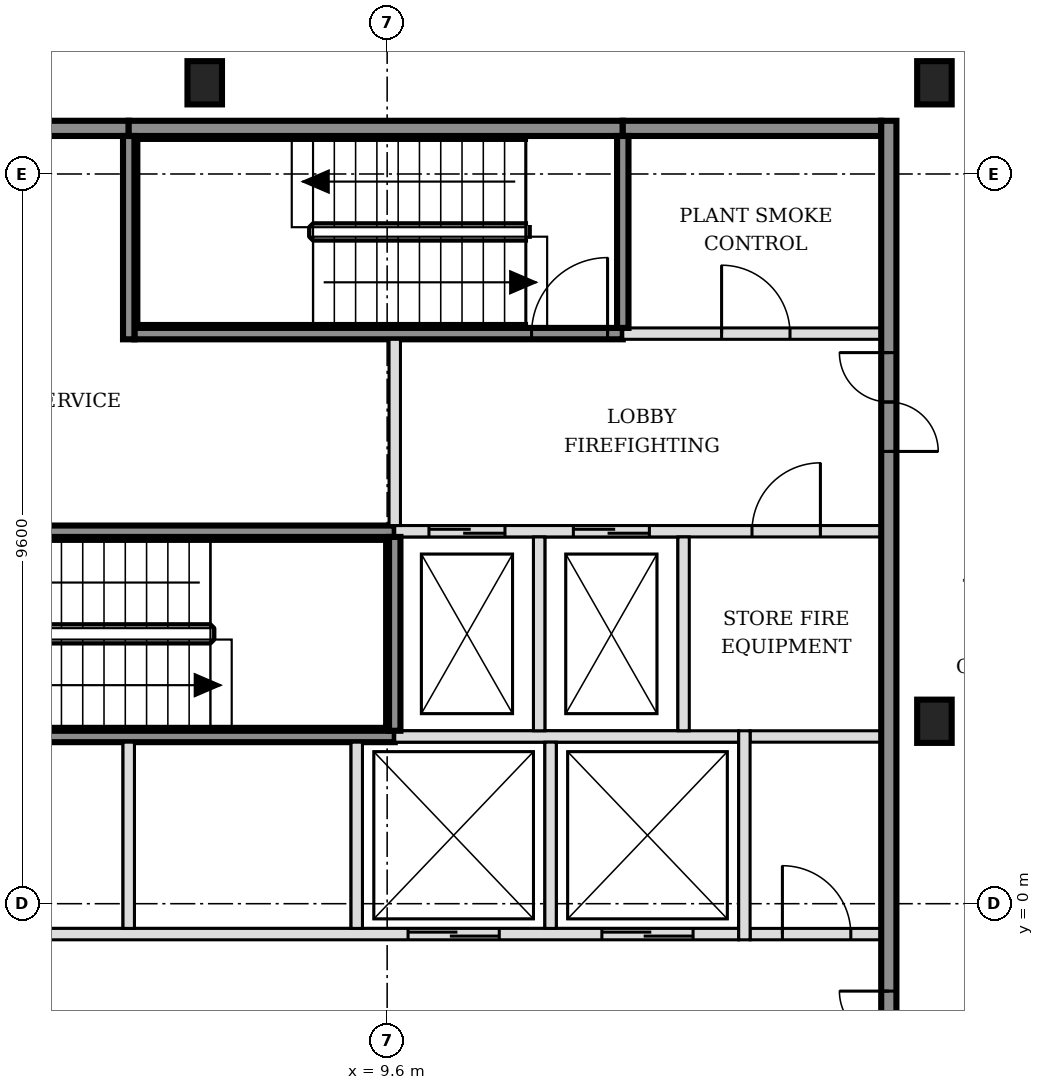
"""IFC4 building model, lengths in metres.
Left out: names, types, materials, properties, quantities, classifications, styles, units other than length and angle.
Written with IfcOpenShell. Run it as: python <this file> out.ifc"""

import sys

from ifc_helpers import new_model, si_unit, direction, frame, frame_2d, origin, origin_2d, place, context, subcontext, project, spatial, rectangle, i_section, extrude, element, fill, save


model = new_model("IFC4")
c1 = context("Model", 3, precision=1e-05, world=origin(), true_north=direction((0.0, 1.0)))
c2 = subcontext(c1, "Body", "Model", "MODEL_VIEW")
j1 = project(units=[si_unit("LENGTHUNIT", "METRE"), si_unit("PLANEANGLEUNIT", "RADIAN")], contexts=[c1])
p1 = place(None, origin())
s1 = spatial("IfcSite", under=j1, at=p1, CompositionType="ELEMENT")
p2 = place(p1, origin())
s2 = spatial("IfcBuilding", under=s1, at=p2, CompositionType="ELEMENT")
p3 = place(p2, frame((0.0, 0.0, 61.8)))
s3 = spatial("IfcBuildingStorey", under=s2, at=p3, CompositionType="ELEMENT", Elevation=61.8)
for number, where, z_axis, x_axis in (
    (1, (16.8, 2.4, -0.15), (0.0, 0.0, 1.0), (1.0, 0.0, 0.0)),
    (2, (7.2, 10.8, -0.15), (0.0, 0.0, 1.0), (1.0, 0.0, 0.0)),
    (3, (16.8, 10.8, -0.15), (0.0, 0.0, 1.0), (1.0, 0.0, 0.0)),
):
    element("IfcColumn", number, at=place(p3, frame(where, z_axis=z_axis, x_axis=x_axis)), inside=s3, PredefinedType="COLUMN", context=c2, shape_type="SweptSolid", body=[
        extrude(i_section(OverallWidth=0.454, OverallDepth=0.569, WebThickness=0.078, FlangeThickness=0.125, FilletRadius=0.015, at=origin_2d()), origin(), (0.0, 0.0, 1.0), 3.6),
    ])
p4 = place(p3, frame((-1.7, -0.4, 0.0), z_axis=(0.0, 0.0, 1.0), x_axis=(1.0, 0.0, 0.0)))
e4 = element("IfcWall", 4, at=p4, inside=s3, PredefinedType="SOLIDWALL", context=c2, shape_type="SweptSolid", body=[
    extrude(rectangle(XDim=15.925, YDim=0.15, at=frame_2d((7.962, 0.0))), origin(), (0.0, 0.0, 1.0), 3.45),
])
p5 = place(p4, frame((0.6, 0.0, 0.0)))
e5 = element("IfcOpeningElement", 5, at=p5, cuts=e4, PredefinedType="OPENING", context=c2, shape_type="SweptSolid", body=[
    extrude(rectangle(XDim=1.1, YDim=2.1, at=frame_2d((0.55, 1.05))), frame((0.0, 0.085, 0.0), z_axis=(0.0, -1.0, 0.0), x_axis=(1.0, 0.0, 0.0)), (0.0, 0.0, 1.0), 0.17),
])
p6 = place(p4, frame((3.1, 0.0, 0.0)))
e6 = element("IfcOpeningElement", 6, at=p6, cuts=e4, PredefinedType="OPENING", context=c2, shape_type="SweptSolid", body=[
    extrude(rectangle(XDim=1.1, YDim=2.1, at=frame_2d((0.55, 1.05))), frame((0.0, 0.085, 0.0), z_axis=(0.0, -1.0, 0.0), x_axis=(1.0, 0.0, 0.0)), (0.0, 0.0, 1.0), 0.17),
])
p7 = place(p4, frame((11.575, 0.0, 0.0)))
e7 = element("IfcOpeningElement", 7, at=p7, cuts=e4, PredefinedType="OPENING", context=c2, shape_type="SweptSolid", body=[
    extrude(rectangle(XDim=1.2, YDim=2.1, at=frame_2d((0.6, 1.05))), frame((0.0, 0.085, 0.0), z_axis=(0.0, -1.0, 0.0), x_axis=(1.0, 0.0, 0.0)), (0.0, 0.0, 1.0), 0.17),
])
p8 = place(p4, frame((14.125, 0.0, 0.0)))
e8 = element("IfcOpeningElement", 8, at=p8, cuts=e4, PredefinedType="OPENING", context=c2, shape_type="SweptSolid", body=[
    extrude(rectangle(XDim=1.2, YDim=2.1, at=frame_2d((0.6, 1.05))), frame((0.0, 0.085, 0.0), z_axis=(0.0, -1.0, 0.0), x_axis=(1.0, 0.0, 0.0)), (0.0, 0.0, 1.0), 0.17),
])
p9 = place(p3, frame((14.375, -0.4, 0.0), z_axis=(0.0, 0.0, 1.0), x_axis=(1.0, 0.0, 0.0)))
e9 = element("IfcWall", 9, at=p9, inside=s3, PredefinedType="PARTITIONING", context=c2, shape_type="SweptSolid", body=[
    extrude(rectangle(XDim=1.725, YDim=0.15, at=frame_2d((0.863, 0.0))), origin(), (0.0, 0.0, 1.0), 3.45),
])
p10 = place(p9, frame((0.425, 0.0, 0.0)))
e10 = element("IfcOpeningElement", 10, at=p10, cuts=e9, PredefinedType="OPENING", context=c2, shape_type="SweptSolid", body=[
    extrude(rectangle(XDim=0.9, YDim=2.1, at=frame_2d((0.45, 1.05))), frame((0.0, 0.085, 0.0), z_axis=(0.0, -1.0, 0.0), x_axis=(1.0, 0.0, 0.0)), (0.0, 0.0, 1.0), 0.17),
])
p11 = place(p3, frame((3.2, 2.2, 0.0), z_axis=(0.0, 0.0, 1.0), x_axis=(1.0, 0.0, 0.0)))
e11 = element("IfcWall", 11, at=p11, inside=s3, PredefinedType="SOLIDWALL", context=c2, shape_type="SweptSolid", body=[
    extrude(rectangle(XDim=6.5, YDim=0.15, at=frame_2d((3.25, 0.0))), origin(), (0.0, 0.0, 1.0), 3.45),
])
p12 = place(p3, frame((9.7, 2.2, 0.0), z_axis=(0.0, 0.0, 1.0), x_axis=(1.0, 0.0, 0.0)))
e12 = element("IfcWall", 12, at=p12, inside=s3, PredefinedType="SOLIDWALL", context=c2, shape_type="SweptSolid", body=[
    extrude(rectangle(XDim=4.525, YDim=0.15, at=frame_2d((2.263, 0.0))), origin(), (0.0, 0.0, 1.0), 3.45),
])
p13 = place(p3, frame((14.375, 2.2, 0.0), z_axis=(0.0, 0.0, 1.0), x_axis=(1.0, 0.0, 0.0)))
e13 = element("IfcWall", 13, at=p13, inside=s3, PredefinedType="PARTITIONING", context=c2, shape_type="SweptSolid", body=[
    extrude(rectangle(XDim=1.725, YDim=0.15, at=frame_2d((0.863, 0.0))), origin(), (0.0, 0.0, 1.0), 3.45),
])
p14 = place(p3, frame((3.275, 4.9, 0.0), z_axis=(0.0, 0.0, 1.0), x_axis=(1.0, 0.0, 0.0)))
e14 = element("IfcWall", 14, at=p14, inside=s3, PredefinedType="SOLIDWALL", context=c2, shape_type="SweptSolid", body=[
    extrude(rectangle(XDim=6.425, YDim=0.15, at=frame_2d((3.212, 0.0))), origin(), (0.0, 0.0, 1.0), 3.45),
])
p15 = place(p14, frame((0.1, 0.0, 0.0)))
e15 = element("IfcOpeningElement", 15, at=p15, cuts=e14, PredefinedType="OPENING", context=c2, shape_type="SweptSolid", body=[
    extrude(rectangle(XDim=1.0, YDim=2.1, at=frame_2d((0.5, 1.05))), frame((0.0, 0.085, 0.0), z_axis=(0.0, -1.0, 0.0), x_axis=(1.0, 0.0, 0.0)), (0.0, 0.0, 1.0), 0.17),
])
p16 = place(p3, frame((9.7, 4.9, 0.0), z_axis=(0.0, 0.0, 1.0), x_axis=(1.0, 0.0, 0.0)))
e16 = element("IfcWall", 16, at=p16, inside=s3, PredefinedType="SOLIDWALL", context=c2, shape_type="SweptSolid", body=[
    extrude(rectangle(XDim=6.4, YDim=0.15, at=frame_2d((3.2, 0.0))), origin(), (0.0, 0.0, 1.0), 3.45),
])
p17 = place(p16, frame((0.45, 0.0, 0.0)))
e17 = element("IfcOpeningElement", 17, at=p17, cuts=e16, PredefinedType="OPENING", context=c2, shape_type="SweptSolid", body=[
    extrude(rectangle(XDim=1.0, YDim=2.1, at=frame_2d((0.5, 1.05))), frame((0.0, 0.085, 0.0), z_axis=(0.0, -1.0, 0.0), x_axis=(1.0, 0.0, 0.0)), (0.0, 0.0, 1.0), 0.17),
])
p18 = place(p16, frame((2.35, 0.0, 0.0)))
e18 = element("IfcOpeningElement", 18, at=p18, cuts=e16, PredefinedType="OPENING", context=c2, shape_type="SweptSolid", body=[
    extrude(rectangle(XDim=1.0, YDim=2.1, at=frame_2d((0.5, 1.05))), frame((0.0, 0.085, 0.0), z_axis=(0.0, -1.0, 0.0), x_axis=(1.0, 0.0, 0.0)), (0.0, 0.0, 1.0), 0.17),
])
p19 = place(p16, frame((4.7, 0.0, 0.0)))
e19 = element("IfcOpeningElement", 19, at=p19, cuts=e16, PredefinedType="OPENING", context=c2, shape_type="SweptSolid", body=[
    extrude(rectangle(XDim=0.9, YDim=2.1, at=frame_2d((0.45, 1.05))), frame((0.0, 0.085, 0.0), z_axis=(0.0, -1.0, 0.0), x_axis=(1.0, 0.0, 0.0)), (0.0, 0.0, 1.0), 0.17),
])
p20 = place(p3, frame((6.275, 7.5, 0.0), z_axis=(0.0, 0.0, 1.0), x_axis=(1.0, 0.0, 0.0)))
e20 = element("IfcWall", 20, at=p20, inside=s3, PredefinedType="SOLIDWALL", context=c2, shape_type="SweptSolid", body=[
    extrude(rectangle(XDim=6.425, YDim=0.15, at=frame_2d((3.212, 0.0))), origin(), (0.0, 0.0, 1.0), 3.45),
])
p21 = place(p20, frame((5.225, 0.0, 0.0)))
e21 = element("IfcOpeningElement", 21, at=p21, cuts=e20, PredefinedType="OPENING", context=c2, shape_type="SweptSolid", body=[
    extrude(rectangle(XDim=1.0, YDim=2.1, at=frame_2d((0.5, 1.05))), frame((0.0, 0.085, 0.0), z_axis=(0.0, -1.0, 0.0), x_axis=(1.0, 0.0, 0.0)), (0.0, 0.0, 1.0), 0.17),
])
p22 = place(p3, frame((12.7, 7.5, 0.0), z_axis=(0.0, 0.0, 1.0), x_axis=(1.0, 0.0, 0.0)))
e22 = element("IfcWall", 22, at=p22, inside=s3, PredefinedType="SOLIDWALL", context=c2, shape_type="SweptSolid", body=[
    extrude(rectangle(XDim=3.4, YDim=0.15, at=frame_2d((1.7, 0.0))), origin(), (0.0, 0.0, 1.0), 3.45),
])
p23 = place(p22, frame((1.3, 0.0, 0.0)))
e23 = element("IfcOpeningElement", 23, at=p23, cuts=e22, PredefinedType="OPENING", context=c2, shape_type="SweptSolid", body=[
    extrude(rectangle(XDim=0.9, YDim=2.1, at=frame_2d((0.45, 1.05))), frame((0.0, 0.085, 0.0), z_axis=(0.0, -1.0, 0.0), x_axis=(1.0, 0.0, 0.0)), (0.0, 0.0, 1.0), 0.17),
])
p24 = place(p3, frame((-1.7, 10.2, 0.0), z_axis=(0.0, 0.0, 1.0), x_axis=(1.0, 0.0, 0.0)))
e24 = element("IfcWall", 24, at=p24, inside=s3, PredefinedType="SOLIDWALL", context=c2, shape_type="SweptSolid", body=[
    extrude(rectangle(XDim=7.9, YDim=0.2, at=frame_2d((3.95, 0.0))), origin(), (0.0, 0.0, 1.0), 3.45),
])
p25 = place(p3, frame((6.2, 10.2, 0.0), z_axis=(0.0, 0.0, 1.0), x_axis=(1.0, 0.0, 0.0)))
e25 = element("IfcWall", 25, at=p25, inside=s3, PredefinedType="SOLIDWALL", context=c2, shape_type="SweptSolid", body=[
    extrude(rectangle(XDim=6.5, YDim=0.2, at=frame_2d((3.25, 0.0))), origin(), (0.0, 0.0, 1.0), 3.45),
])
p26 = place(p3, frame((12.7, 10.2, 0.0), z_axis=(0.0, 0.0, 1.0), x_axis=(1.0, 0.0, 0.0)))
e26 = element("IfcWall", 26, at=p26, inside=s3, PredefinedType="SOLIDWALL", context=c2, shape_type="SweptSolid", body=[
    extrude(rectangle(XDim=3.4, YDim=0.2, at=frame_2d((1.7, 0.0))), origin(), (0.0, 0.0, 1.0), 3.45),
])
p27 = place(p3, frame((6.2, -0.325, 0.0), z_axis=(0.0, 0.0, 1.0), x_axis=(0.0, 1.0, 0.0)))
e27 = element("IfcWall", 27, at=p27, inside=s3, PredefinedType="SOLIDWALL", context=c2, shape_type="SweptSolid", body=[
    extrude(rectangle(XDim=2.45, YDim=0.15, at=frame_2d((1.225, 0.0))), origin(), (0.0, 0.0, 1.0), 3.45),
])
p28 = place(p3, frame((6.2, 7.425, 0.0), z_axis=(0.0, 0.0, 1.0), x_axis=(0.0, 1.0, 0.0)))
e28 = element("IfcWall", 28, at=p28, inside=s3, PredefinedType="SOLIDWALL", context=c2, shape_type="SweptSolid", body=[
    extrude(rectangle(XDim=2.675, YDim=0.15, at=frame_2d((1.337, 0.0))), origin(), (0.0, 0.0, 1.0), 3.45),
])
p29 = place(p3, frame((9.2, -0.325, 0.0), z_axis=(0.0, 0.0, 1.0), x_axis=(0.0, 1.0, 0.0)))
e29 = element("IfcWall", 29, at=p29, inside=s3, PredefinedType="SOLIDWALL", context=c2, shape_type="SweptSolid", body=[
    extrude(rectangle(XDim=2.45, YDim=0.15, at=frame_2d((1.225, 0.0))), origin(), (0.0, 0.0, 1.0), 3.45),
])
p30 = place(p3, frame((9.7, 2.275, 0.0), z_axis=(0.0, 0.0, 1.0), x_axis=(0.0, 1.0, 0.0)))
e30 = element("IfcWall", 30, at=p30, inside=s3, PredefinedType="SOLIDWALL", context=c2, shape_type="SweptSolid", body=[
    extrude(rectangle(XDim=2.55, YDim=0.15, at=frame_2d((1.275, 0.0))), origin(), (0.0, 0.0, 1.0), 3.45),
])
p31 = place(p3, frame((9.7, 4.975, 0.0), z_axis=(0.0, 0.0, 1.0), x_axis=(0.0, 1.0, 0.0)))
e31 = element("IfcWall", 31, at=p31, inside=s3, PredefinedType="SOLIDWALL", context=c2, shape_type="SweptSolid", body=[
    extrude(rectangle(XDim=2.45, YDim=0.15, at=frame_2d((1.225, 0.0))), origin(), (0.0, 0.0, 1.0), 3.45),
])
p32 = place(p3, frame((11.6, 2.275, 0.0), z_axis=(0.0, 0.0, 1.0), x_axis=(0.0, 1.0, 0.0)))
e32 = element("IfcWall", 32, at=p32, inside=s3, PredefinedType="SOLIDWALL", context=c2, shape_type="SweptSolid", body=[
    extrude(rectangle(XDim=2.55, YDim=0.15, at=frame_2d((1.275, 0.0))), origin(), (0.0, 0.0, 1.0), 3.45),
])
p33 = place(p3, frame((11.75, -0.325, 0.0), z_axis=(0.0, 0.0, 1.0), x_axis=(0.0, 1.0, 0.0)))
e33 = element("IfcWall", 33, at=p33, inside=s3, PredefinedType="SOLIDWALL", context=c2, shape_type="SweptSolid", body=[
    extrude(rectangle(XDim=2.45, YDim=0.15, at=frame_2d((1.225, 0.0))), origin(), (0.0, 0.0, 1.0), 3.45),
])
p34 = place(p3, frame((12.7, 7.575, 0.0), z_axis=(0.0, 0.0, 1.0), x_axis=(0.0, 1.0, 0.0)))
e34 = element("IfcWall", 34, at=p34, inside=s3, PredefinedType="SOLIDWALL", context=c2, shape_type="SweptSolid", body=[
    extrude(rectangle(XDim=2.525, YDim=0.15, at=frame_2d((1.263, 0.0))), origin(), (0.0, 0.0, 1.0), 3.45),
])
p35 = place(p3, frame((13.5, 2.275, 0.0), z_axis=(0.0, 0.0, 1.0), x_axis=(0.0, 1.0, 0.0)))
e35 = element("IfcWall", 35, at=p35, inside=s3, PredefinedType="SOLIDWALL", context=c2, shape_type="SweptSolid", body=[
    extrude(rectangle(XDim=2.55, YDim=0.15, at=frame_2d((1.275, 0.0))), origin(), (0.0, 0.0, 1.0), 3.45),
])
p36 = place(p3, frame((14.3, -0.475, 0.0), z_axis=(0.0, 0.0, 1.0), x_axis=(0.0, 1.0, 0.0)))
e36 = element("IfcWall", 36, at=p36, inside=s3, PredefinedType="SOLIDWALL", context=c2, shape_type="SweptSolid", body=[
    extrude(rectangle(XDim=2.75, YDim=0.15, at=frame_2d((1.375, 0.0))), origin(), (0.0, 0.0, 1.0), 3.45),
])
p37 = place(p3, frame((16.2, -5.5, 0.0), z_axis=(0.0, 0.0, 1.0), x_axis=(0.0, 1.0, 0.0)))
e37 = element("IfcWall", 37, at=p37, inside=s3, PredefinedType="SOLIDWALL", context=c2, shape_type="SweptSolid", body=[
    extrude(rectangle(XDim=15.8, YDim=0.2, at=frame_2d((7.9, 0.0))), origin(), (0.0, 0.0, 1.0), 3.45),
])
p38 = place(p37, frame((3.05, 0.0, 0.0)))
e38 = element("IfcOpeningElement", 38, at=p38, cuts=e37, PredefinedType="OPENING", context=c2, shape_type="SweptSolid", body=[
    extrude(rectangle(XDim=1.3, YDim=2.1, at=frame_2d((0.65, 1.05))), frame((0.0, 0.11, 0.0), z_axis=(0.0, -1.0, 0.0), x_axis=(1.0, 0.0, 0.0)), (0.0, 0.0, 1.0), 0.22),
])
p39 = place(p37, frame((11.45, 0.0, 0.0)))
e39 = element("IfcOpeningElement", 39, at=p39, cuts=e37, PredefinedType="OPENING", context=c2, shape_type="SweptSolid", body=[
    extrude(rectangle(XDim=1.3, YDim=2.1, at=frame_2d((0.65, 1.05))), frame((0.0, 0.11, 0.0), z_axis=(0.0, -1.0, 0.0), x_axis=(1.0, 0.0, 0.0)), (0.0, 0.0, 1.0), 0.22),
])
p40 = place(p7, origin())
e40 = element("IfcDoor", 40, at=p40, inside=s3, OperationType="DOUBLE_DOOR_SLIDING", PredefinedType="DOOR", context=c2, shape_type="SweptSolid", body=[
    extrude(rectangle(XDim=1.2, YDim=2.1, at=frame_2d((0.6, 1.05))), frame((0.0, 0.025, 0.0), z_axis=(0.0, -1.0, 0.0), x_axis=(1.0, 0.0, 0.0)), (0.0, 0.0, 1.0), 0.05),
])
fill(e7, e40)
p41 = place(p8, origin())
e41 = element("IfcDoor", 41, at=p41, inside=s3, OperationType="DOUBLE_DOOR_SLIDING", PredefinedType="DOOR", context=c2, shape_type="SweptSolid", body=[
    extrude(rectangle(XDim=1.2, YDim=2.1, at=frame_2d((0.6, 1.05))), frame((0.0, 0.025, 0.0), z_axis=(0.0, -1.0, 0.0), x_axis=(1.0, 0.0, 0.0)), (0.0, 0.0, 1.0), 0.05),
])
fill(e8, e41)
p42 = place(p17, origin())
e42 = element("IfcDoor", 42, at=p42, inside=s3, OperationType="DOUBLE_DOOR_SLIDING", PredefinedType="DOOR", context=c2, shape_type="SweptSolid", body=[
    extrude(rectangle(XDim=1.0, YDim=2.1, at=frame_2d((0.5, 1.05))), frame((0.0, 0.025, 0.0), z_axis=(0.0, -1.0, 0.0), x_axis=(1.0, 0.0, 0.0)), (0.0, 0.0, 1.0), 0.05),
])
fill(e17, e42)
p43 = place(p18, origin())
e43 = element("IfcDoor", 43, at=p43, inside=s3, OperationType="DOUBLE_DOOR_SLIDING", PredefinedType="DOOR", context=c2, shape_type="SweptSolid", body=[
    extrude(rectangle(XDim=1.0, YDim=2.1, at=frame_2d((0.5, 1.05))), frame((0.0, 0.025, 0.0), z_axis=(0.0, -1.0, 0.0), x_axis=(1.0, 0.0, 0.0)), (0.0, 0.0, 1.0), 0.05),
])
fill(e18, e43)
p44 = place(p21, origin())
e44 = element("IfcDoor", 44, at=p44, inside=s3, OperationType="SINGLE_SWING_RIGHT", PredefinedType="DOOR", context=c2, shape_type="SweptSolid", body=[
    extrude(rectangle(XDim=1.0, YDim=2.1, at=frame_2d((0.5, 1.05))), frame((0.0, 0.025, 0.0), z_axis=(0.0, -1.0, 0.0), x_axis=(1.0, 0.0, 0.0)), (0.0, 0.0, 1.0), 0.05),
])
fill(e21, e44)
p45 = place(p38, origin())
e45 = element("IfcDoor", 45, at=p45, inside=s3, OperationType="DOUBLE_DOOR_SINGLE_SWING", PredefinedType="DOOR", context=c2, shape_type="SweptSolid", body=[
    extrude(rectangle(XDim=1.3, YDim=2.1, at=frame_2d((0.65, 1.05))), frame((0.0, 0.025, 0.0), z_axis=(0.0, -1.0, 0.0), x_axis=(1.0, 0.0, 0.0)), (0.0, 0.0, 1.0), 0.05),
])
fill(e38, e45)
p46 = place(p39, origin())
e46 = element("IfcDoor", 46, at=p46, inside=s3, OperationType="DOUBLE_DOOR_SINGLE_SWING", PredefinedType="DOOR", context=c2, shape_type="SweptSolid", body=[
    extrude(rectangle(XDim=1.3, YDim=2.1, at=frame_2d((0.65, 1.05))), frame((0.0, 0.025, 0.0), z_axis=(0.0, -1.0, 0.0), x_axis=(1.0, 0.0, 0.0)), (0.0, 0.0, 1.0), 0.05),
])
fill(e39, e46)
p47 = place(p10, origin())
e47 = element("IfcDoor", 47, at=p47, inside=s3, OperationType="SINGLE_SWING_LEFT", PredefinedType="DOOR", context=c2, shape_type="SweptSolid", body=[
    extrude(rectangle(XDim=0.9, YDim=2.1, at=frame_2d((0.45, 1.05))), frame((0.0, 0.025, 0.0), z_axis=(0.0, -1.0, 0.0), x_axis=(1.0, 0.0, 0.0)), (0.0, 0.0, 1.0), 0.05),
])
fill(e10, e47)
p48 = place(p19, origin())
e48 = element("IfcDoor", 48, at=p48, inside=s3, OperationType="SINGLE_SWING_RIGHT", PredefinedType="DOOR", context=c2, shape_type="SweptSolid", body=[
    extrude(rectangle(XDim=0.9, YDim=2.1, at=frame_2d((0.45, 1.05))), frame((0.0, 0.025, 0.0), z_axis=(0.0, -1.0, 0.0), x_axis=(1.0, 0.0, 0.0)), (0.0, 0.0, 1.0), 0.05),
])
fill(e19, e48)
p49 = place(p23, origin())
e49 = element("IfcDoor", 49, at=p49, inside=s3, OperationType="SINGLE_SWING_LEFT", PredefinedType="DOOR", context=c2, shape_type="SweptSolid", body=[
    extrude(rectangle(XDim=0.9, YDim=2.1, at=frame_2d((0.45, 1.05))), frame((0.0, 0.025, 0.0), z_axis=(0.0, -1.0, 0.0), x_axis=(1.0, 0.0, 0.0)), (0.0, 0.0, 1.0), 0.05),
])
fill(e23, e49)
save(model, sys.argv[1])
